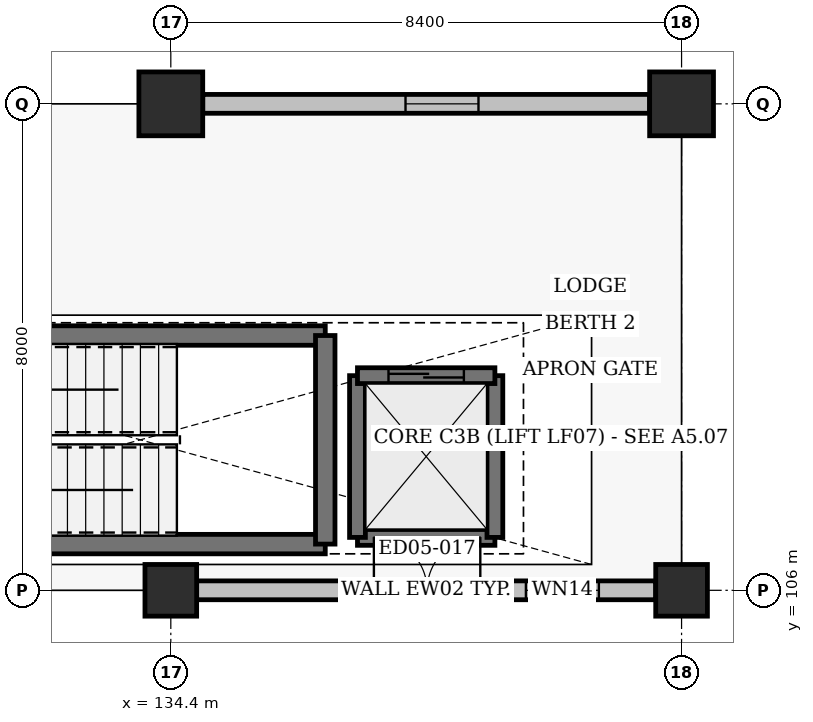
"""IFC4 building model, lengths in metres.
Left out: names, types, materials, properties, quantities, classifications, styles, units other than length and angle.
Written with IfcOpenShell. Run it as: python <this file> out.ifc"""

import sys

from ifc_helpers import new_model, si_unit, direction, frame, frame_2d, origin, origin_2d, place, context, subcontext, project, spatial, rectangle, circle, extrude, element, fill, save


model = new_model("IFC4")
c1 = context("Model", 3, precision=1e-05, world=origin(), true_north=direction((0.0, 1.0)))
c2 = subcontext(c1, "Body", "Model", "MODEL_VIEW")
j1 = project(units=[si_unit("LENGTHUNIT", "METRE"), si_unit("PLANEANGLEUNIT", "RADIAN")], contexts=[c1])
p1 = place(None, origin())
s1 = spatial("IfcSite", under=j1, at=p1, CompositionType="ELEMENT")
p2 = place(p1, origin())
s2 = spatial("IfcBuilding", under=s1, at=p2, CompositionType="ELEMENT")
p3 = place(p2, origin())
s3 = spatial("IfcBuildingStorey", under=s2, at=p3, CompositionType="ELEMENT", Elevation=0.0)
p4 = place(p3, frame((134.4, 106.0, -0.46), z_axis=(0.0, 0.0, 1.0), x_axis=(1.0, 0.0, 0.0)))
e1 = element("IfcColumn", 1, at=p4, inside=s3, PredefinedType="COLUMN", context=c2, shape_type="SweptSolid", body=[
    extrude(circle(Radius=0.425, at=origin_2d()), origin(), (0.0, 0.0, 1.0), 5.9),
])
p5 = place(p3, frame((134.4, 114.0, -0.46), z_axis=(0.0, 0.0, 1.0), x_axis=(1.0, 0.0, 0.0)))
e2 = element("IfcColumn", 2, at=p5, inside=s3, PredefinedType="PILASTER", context=c2, shape_type="SweptSolid", body=[
    extrude(circle(Radius=0.525, at=origin_2d()), origin(), (0.0, 0.0, 1.0), 5.9),
])
p6 = place(p3, frame((142.8, 106.0, -0.46), z_axis=(0.0, 0.0, 1.0), x_axis=(1.0, 0.0, 0.0)))
e3 = element("IfcColumn", 3, at=p6, inside=s3, PredefinedType="COLUMN", context=c2, shape_type="SweptSolid", body=[
    extrude(circle(Radius=0.425, at=origin_2d()), origin(), (0.0, 0.0, 1.0), 5.9),
])
p7 = place(p3, frame((142.8, 114.0, -0.46), z_axis=(0.0, 0.0, 1.0), x_axis=(1.0, 0.0, 0.0)))
e4 = element("IfcColumn", 4, at=p7, inside=s3, PredefinedType="PILASTER", context=c2, shape_type="SweptSolid", body=[
    extrude(circle(Radius=0.525, at=origin_2d()), origin(), (0.0, 0.0, 1.0), 5.9),
])
p8 = place(p3, frame((134.825, 106.0, 0.0), z_axis=(0.0, 0.0, 1.0), x_axis=(1.0, 0.0, 0.0)))
e5 = element("IfcWall", 5, at=p8, inside=s3, PredefinedType="SOLIDWALL", context=c2, shape_type="SweptSolid", body=[
    extrude(rectangle(XDim=7.55, YDim=0.31, at=frame_2d((3.775, 0.0))), origin(), (0.0, 0.0, 1.0), 4.835),
])
p9 = place(p8, frame((2.915, 0.0, 0.0)))
e6 = element("IfcOpeningElement", 6, at=p9, cuts=e5, PredefinedType="OPENING", context=c2, shape_type="SweptSolid", body=[
    extrude(rectangle(XDim=1.75, YDim=2.15, at=frame_2d((0.875, 1.075))), frame((0.0, 0.165, 0.0), z_axis=(0.0, -1.0, 0.0), x_axis=(1.0, 0.0, 0.0)), (0.0, 0.0, 1.0), 0.33),
])
p10 = place(p8, frame((5.415, 0.0, 1.05)))
e7 = element("IfcOpeningElement", 7, at=p10, cuts=e5, PredefinedType="OPENING", context=c2, shape_type="SweptSolid", body=[
    extrude(rectangle(XDim=1.2, YDim=1.25, at=frame_2d((0.6, 0.625))), frame((0.0, 0.165, 0.0), z_axis=(0.0, -1.0, 0.0), x_axis=(1.0, 0.0, 0.0)), (0.0, 0.0, 1.0), 0.33),
])
p11 = place(p3, frame((142.275, 114.0, 0.0), z_axis=(0.0, 0.0, 1.0), x_axis=(-1.0, 0.0, 0.0)))
e8 = element("IfcWall", 8, at=p11, inside=s3, PredefinedType="SOLIDWALL", context=c2, shape_type="SweptSolid", body=[
    extrude(rectangle(XDim=7.35, YDim=0.31, at=frame_2d((3.675, 0.0))), origin(), (0.0, 0.0, 1.0), 4.835),
])
p12 = place(p11, frame((2.815, 0.0, 1.05)))
e9 = element("IfcOpeningElement", 9, at=p12, cuts=e8, PredefinedType="OPENING", context=c2, shape_type="SweptSolid", body=[
    extrude(rectangle(XDim=1.2, YDim=1.25, at=frame_2d((0.6, 0.625))), frame((0.0, 0.165, 0.0), z_axis=(0.0, -1.0, 0.0), x_axis=(1.0, 0.0, 0.0)), (0.0, 0.0, 1.0), 0.33),
])
for number, where, z_axis, x_axis in (
    (10, (128.06, 106.76, 0.0), (0.0, 0.0, 1.0), (1.0, 0.0, 0.0)),
    (11, (128.06, 110.19, 0.0), (0.0, 0.0, 1.0), (1.0, 0.0, 0.0)),
):
    element("IfcWall", number, at=place(p3, frame(where, z_axis=z_axis, x_axis=x_axis)), inside=s3, PredefinedType="SHEAR", context=c2, shape_type="SweptSolid", body=[
        extrude(rectangle(XDim=8.88, YDim=0.32, at=frame_2d((4.44, 0.0))), origin(), (0.0, 0.0, 1.0), 5.44),
    ])
p13 = place(p3, frame((136.94, 106.76, 0.0), z_axis=(0.0, 0.0, 1.0), x_axis=(0.0, 1.0, 0.0)))
e12 = element("IfcWall", 12, at=p13, inside=s3, PredefinedType="SHEAR", context=c2, shape_type="SweptSolid", body=[
    extrude(rectangle(XDim=3.43, YDim=0.32, at=frame_2d((1.715, 0.0))), origin(), (0.0, 0.0, 1.0), 5.44),
])
p14 = place(p3, frame((137.47, 106.87, 0.0), z_axis=(0.0, 0.0, 1.0), x_axis=(1.0, 0.0, 0.0)))
e13 = element("IfcWall", 13, at=p14, inside=s3, PredefinedType="SHEAR", context=c2, shape_type="SweptSolid", body=[
    extrude(rectangle(XDim=2.26, YDim=0.26, at=frame_2d((1.13, 0.0))), origin(), (0.0, 0.0, 1.0), 5.44),
])
for number, where, z_axis, x_axis in (
    (14, (139.73, 106.87, 0.0), (0.0, 0.0, 1.0), (0.0, 1.0, 0.0)),
    (15, (137.47, 109.53, 0.0), (0.0, 0.0, 1.0), (0.0, -1.0, 0.0)),
):
    element("IfcWall", number, at=place(p3, frame(where, z_axis=z_axis, x_axis=x_axis)), inside=s3, PredefinedType="SHEAR", context=c2, shape_type="SweptSolid", body=[
        extrude(rectangle(XDim=2.66, YDim=0.26, at=frame_2d((1.33, 0.0))), origin(), (0.0, 0.0, 1.0), 5.44),
    ])
p15 = place(p3, frame((137.47, 109.53, 0.0), z_axis=(0.0, 0.0, 1.0), x_axis=(1.0, 0.0, 0.0)))
e16 = element("IfcWall", 16, at=p15, inside=s3, PredefinedType="SHEAR", context=c2, shape_type="SweptSolid", body=[
    extrude(rectangle(XDim=2.26, YDim=0.26, at=frame_2d((1.13, 0.0))), origin(), (0.0, 0.0, 1.0), 5.44),
])
p16 = place(p15, frame((0.51, 0.0, 0.0)))
e17 = element("IfcOpeningElement", 17, at=p16, cuts=e16, PredefinedType="OPENING", context=c2, shape_type="SweptSolid", body=[
    extrude(rectangle(XDim=1.24, YDim=2.14, at=frame_2d((0.62, 1.07))), frame((0.0, 0.14, 0.0), z_axis=(0.0, -1.0, 0.0), x_axis=(1.0, 0.0, 0.0)), (0.0, 0.0, 1.0), 0.28),
])
p17 = place(p9, origin())
e18 = element("IfcDoor", 18, at=p17, inside=s3, OperationType="DOUBLE_DOOR_SINGLE_SWING", PredefinedType="DOOR", context=c2, shape_type="SweptSolid", body=[
    extrude(rectangle(XDim=1.75, YDim=2.15, at=frame_2d((0.875, 1.075))), frame((0.0, 0.025, 0.0), z_axis=(0.0, -1.0, 0.0), x_axis=(1.0, 0.0, 0.0)), (0.0, 0.0, 1.0), 0.05),
])
fill(e6, e18)
p18 = place(p10, origin())
e19 = element("IfcWindow", 19, at=p18, inside=s3, PartitioningType="SINGLE_PANEL", PredefinedType="WINDOW", context=c2, shape_type="SweptSolid", body=[
    extrude(rectangle(XDim=1.2, YDim=1.25, at=frame_2d((0.6, 0.625))), frame((0.0, 0.03, 0.0), z_axis=(0.0, -1.0, 0.0), x_axis=(1.0, 0.0, 0.0)), (0.0, 0.0, 1.0), 0.06),
])
fill(e7, e19)
p19 = place(p12, origin())
e20 = element("IfcWindow", 20, at=p19, inside=s3, PartitioningType="SINGLE_PANEL", PredefinedType="WINDOW", context=c2, shape_type="SweptSolid", body=[
    extrude(rectangle(XDim=1.2, YDim=1.25, at=frame_2d((0.6, 0.625))), frame((0.0, 0.03, 0.0), z_axis=(0.0, -1.0, 0.0), x_axis=(1.0, 0.0, 0.0)), (0.0, 0.0, 1.0), 0.06),
])
fill(e9, e20)
p20 = place(p16, origin())
e21 = element("IfcDoor", 21, at=p20, inside=s3, OperationType="DOUBLE_DOOR_SLIDING", PredefinedType="DOOR", context=c2, shape_type="SweptSolid", body=[
    extrude(rectangle(XDim=1.24, YDim=2.14, at=frame_2d((0.62, 1.07))), frame((0.0, 0.025, 0.0), z_axis=(0.0, -1.0, 0.0), x_axis=(1.0, 0.0, 0.0)), (0.0, 0.0, 1.0), 0.05),
])
fill(e17, e21)
save(model, sys.argv[1])
